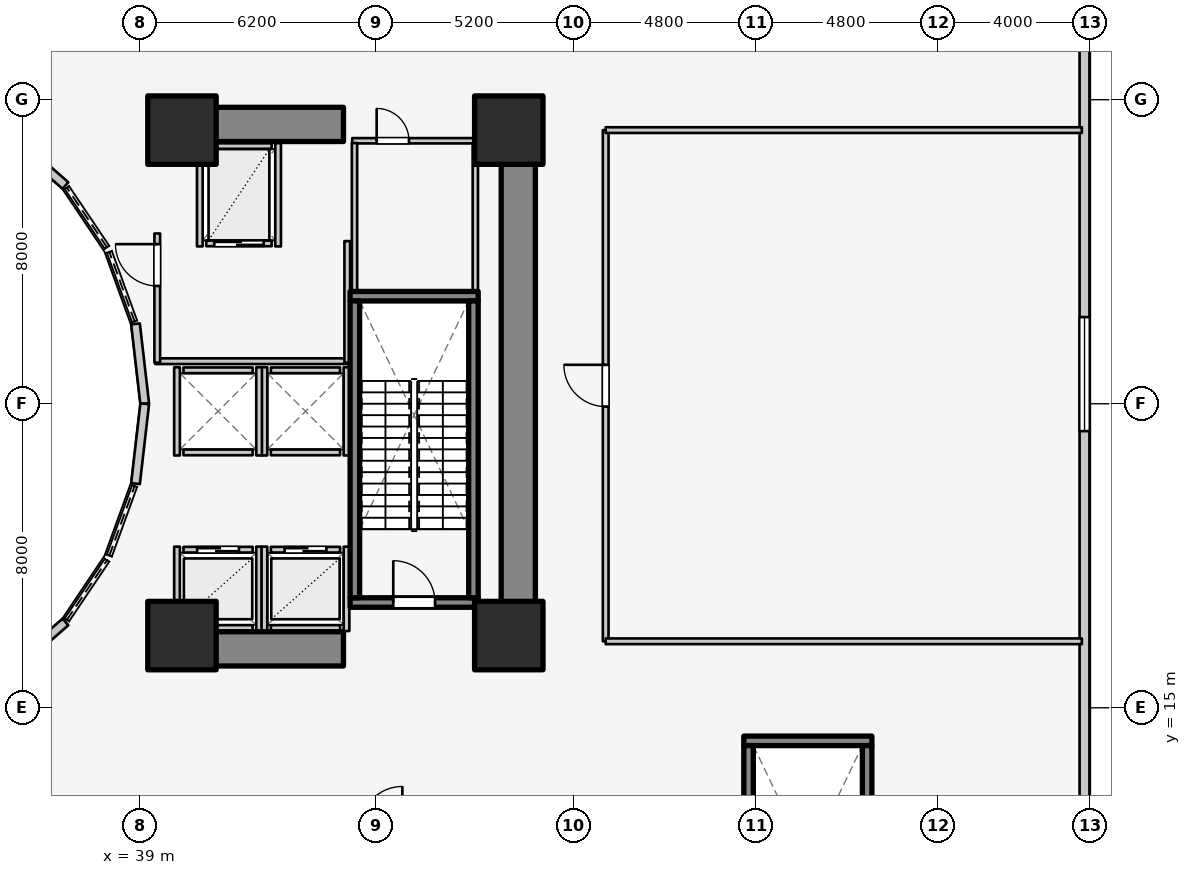
"""IFC4 building model, lengths in metres.
Left out: names, types, materials, properties, quantities, classifications, styles, units other than length and angle.
Written with IfcOpenShell. Run it as: python <this file> out.ifc"""

import sys

from ifc_helpers import new_model, si_unit, direction, frame, frame_2d, origin, origin_2d, place, context, subcontext, project, spatial, rectangle, extrude, element, fill, save


model = new_model("IFC4")
c1 = context("Model", 3, precision=1e-05, world=origin(), true_north=direction((0.0, 1.0)))
c2 = subcontext(c1, "Body", "Model", "MODEL_VIEW")
j1 = project(units=[si_unit("LENGTHUNIT", "METRE"), si_unit("PLANEANGLEUNIT", "RADIAN")], contexts=[c1])
p1 = place(None, origin())
s1 = spatial("IfcSite", under=j1, at=p1, CompositionType="ELEMENT")
p2 = place(p1, origin())
s2 = spatial("IfcBuilding", under=s1, at=p2, CompositionType="ELEMENT")
p3 = place(p2, frame((0.0, 0.0, 4.6)))
s3 = spatial("IfcBuildingStorey", under=s2, at=p3, CompositionType="ELEMENT", Elevation=4.6)
p4 = place(p3, frame((48.95, 17.05, 0.0), z_axis=(0.0, 0.0, 1.0), x_axis=(0.0, 1.0, 0.0)))
e1 = element("IfcWall", 1, at=p4, inside=s3, PredefinedType="SHEAR", context=c2, shape_type="SweptSolid", body=[
    extrude(rectangle(XDim=12.8, YDim=0.9, at=frame_2d((6.4, 0.0))), origin(), (0.0, 0.0, 1.0), 4.6),
])
for number, where, z_axis, x_axis in (
    (2, (39.85, 16.55, 0.0), (0.0, 0.0, 1.0), (1.0, 0.0, 0.0)),
    (3, (39.85, 30.35, 0.0), (0.0, 0.0, 1.0), (1.0, 0.0, 0.0)),
):
    element("IfcWall", number, at=place(p3, frame(where, z_axis=z_axis, x_axis=x_axis)), inside=s3, PredefinedType="SHEAR", context=c2, shape_type="SweptSolid", body=[
        extrude(rectangle(XDim=4.5, YDim=0.9, at=frame_2d((2.25, 0.0))), origin(), (0.0, 0.0, 1.0), 4.6),
    ])
p5 = place(p3, frame((44.525, 17.77, 0.0), z_axis=(0.0, 0.0, 1.0), x_axis=(1.0, 0.0, 0.0)))
e4 = element("IfcWall", 4, at=p5, inside=s3, PredefinedType="SOLIDWALL", context=c2, shape_type="SweptSolid", body=[
    extrude(rectangle(XDim=3.37, YDim=0.25, at=frame_2d((1.685, 0.0))), origin(), (0.0, 0.0, 1.0), 4.6),
])
p6 = place(p5, frame((1.135, 0.0, 0.0)))
e5 = element("IfcOpeningElement", 5, at=p6, cuts=e4, PredefinedType="OPENING", context=c2, shape_type="SweptSolid", body=[
    extrude(rectangle(XDim=1.1, YDim=2.1, at=frame_2d((0.55, 1.05))), frame((0.0, 0.135, 0.0), z_axis=(0.0, -1.0, 0.0), x_axis=(1.0, 0.0, 0.0)), (0.0, 0.0, 1.0), 0.27),
])
p7 = place(p3, frame((44.525, 25.83, 0.0), z_axis=(0.0, 0.0, 1.0), x_axis=(1.0, 0.0, 0.0)))
e6 = element("IfcWall", 6, at=p7, inside=s3, PredefinedType="SOLIDWALL", context=c2, shape_type="SweptSolid", body=[
    extrude(rectangle(XDim=3.37, YDim=0.25, at=frame_2d((1.685, 0.0))), origin(), (0.0, 0.0, 1.0), 4.6),
])
for number, where, z_axis, x_axis in (
    (7, (44.65, 17.895, 0.0), (0.0, 0.0, 1.0), (0.0, 1.0, 0.0)),
    (8, (47.77, 17.895, 0.0), (0.0, 0.0, 1.0), (0.0, 1.0, 0.0)),
):
    element("IfcWall", number, at=place(p3, frame(where, z_axis=z_axis, x_axis=x_axis)), inside=s3, PredefinedType="SOLIDWALL", context=c2, shape_type="SweptSolid", body=[
        extrude(rectangle(XDim=7.81, YDim=0.25, at=frame_2d((3.905, 0.0))), origin(), (0.0, 0.0, 1.0), 4.6),
    ])
p8 = place(p3, frame((54.885, 14.13, 0.0), z_axis=(0.0, 0.0, 1.0), x_axis=(1.0, 0.0, 0.0)))
e9 = element("IfcWall", 9, at=p8, inside=s3, PredefinedType="SOLIDWALL", context=c2, shape_type="SweptSolid", body=[
    extrude(rectangle(XDim=3.37, YDim=0.25, at=frame_2d((1.685, 0.0))), origin(), (0.0, 0.0, 1.0), 4.6),
])
for number, where, z_axis, x_axis in (
    (10, (55.01, 6.195, 0.0), (0.0, 0.0, 1.0), (0.0, 1.0, 0.0)),
    (11, (58.13, 6.195, 0.0), (0.0, 0.0, 1.0), (0.0, 1.0, 0.0)),
):
    element("IfcWall", number, at=place(p3, frame(where, z_axis=z_axis, x_axis=x_axis)), inside=s3, PredefinedType="SOLIDWALL", context=c2, shape_type="SweptSolid", body=[
        extrude(rectangle(XDim=7.81, YDim=0.25, at=frame_2d((3.905, 0.0))), origin(), (0.0, 0.0, 1.0), 4.6),
    ])
for number, where, z_axis, x_axis in (
    (12, (40.1, 16.9, 0.0), (0.0, 0.0, 1.0), (1.0, 0.0, 0.0)),
    (13, (48.7, 16.9, 0.0), (0.0, 0.0, 1.0), (1.0, 0.0, 0.0)),
    (14, (48.7, 30.2, 0.0), (0.0, 0.0, 1.0), (1.0, 0.0, 0.0)),
    (15, (40.1, 30.2, 0.0), (0.0, 0.0, 1.0), (1.0, 0.0, 0.0)),
):
    element("IfcColumn", number, at=place(p3, frame(where, z_axis=z_axis, x_axis=x_axis)), inside=s3, PredefinedType="COLUMN", context=c2, shape_type="SweptSolid", body=[
        extrude(rectangle(XDim=1.8, YDim=1.8, at=origin_2d()), origin(), (0.0, 0.0, 1.0), 4.6),
    ])
p9 = place(p3, frame((63.85, 0.28, 0.0), z_axis=(0.0, 0.0, 1.0), x_axis=(0.0, 1.0, 0.0)))
e16 = element("IfcWall", 16, at=p9, inside=s3, PredefinedType="STANDARD", context=c2, shape_type="SweptSolid", body=[
    extrude(rectangle(XDim=45.44, YDim=0.26, at=frame_2d((22.72, 0.0))), origin(), (0.0, 0.0, 1.0), 4.28),
])
p10 = place(p9, frame((6.0, 0.0, 0.9)))
e17 = element("IfcOpeningElement", 17, at=p10, cuts=e16, PredefinedType="OPENING", context=c2, shape_type="SweptSolid", body=[
    extrude(rectangle(XDim=3.0, YDim=2.4, at=frame_2d((1.5, 1.2))), frame((0.0, 0.14, 0.0), z_axis=(0.0, -1.0, 0.0), x_axis=(1.0, 0.0, 0.0)), (0.0, 0.0, 1.0), 0.28),
])
p11 = place(p9, frame((22.0, 0.0, 0.9)))
e18 = element("IfcOpeningElement", 18, at=p11, cuts=e16, PredefinedType="OPENING", context=c2, shape_type="SweptSolid", body=[
    extrude(rectangle(XDim=3.0, YDim=2.4, at=frame_2d((1.5, 1.2))), frame((0.0, 0.14, 0.0), z_axis=(0.0, -1.0, 0.0), x_axis=(1.0, 0.0, 0.0)), (0.0, 0.0, 1.0), 0.28),
])
p12 = place(p9, frame((38.0, 0.0, 0.9)))
e19 = element("IfcOpeningElement", 19, at=p12, cuts=e16, PredefinedType="OPENING", context=c2, shape_type="SweptSolid", body=[
    extrude(rectangle(XDim=3.0, YDim=2.4, at=frame_2d((1.5, 1.2))), frame((0.0, 0.14, 0.0), z_axis=(0.0, -1.0, 0.0), x_axis=(1.0, 0.0, 0.0)), (0.0, 0.0, 1.0), 0.28),
])
p13 = place(p3, frame((39.12, 23.0, 0.0), z_axis=(0.0, 0.0, 1.0), x_axis=(-0.114711713601, 0.993398823617, 0.0)))
e20 = element("IfcWall", 20, at=p13, inside=s3, PredefinedType="STANDARD", context=c2, shape_type="SweptSolid", body=[
    extrude(rectangle(XDim=2.115, YDim=0.23, at=frame_2d((1.058, 0.0))), origin(), (0.0, 0.0, 1.0), 3.28),
])
for number, where, z_axis, x_axis in (
    (21, (37.035, 28.742, 0.0), (0.0, 0.0, 1.0), (-0.753, 0.659, 0.0)),
    (22, (35.56, 15.968, 0.0), (0.0, 0.0, 1.0), (0.753, 0.659, 0.0)),
):
    element("IfcWall", number, at=place(p3, frame(where, z_axis=z_axis, x_axis=x_axis)), inside=s3, PredefinedType="STANDARD", context=c2, shape_type="SweptSolid", body=[
        extrude(rectangle(XDim=1.959, YDim=0.23, at=frame_2d((0.98, 0.0))), origin(), (0.0, 0.0, 1.0), 3.28),
    ])
p14 = place(p3, frame((38.877, 20.898, 0.0), z_axis=(0.0, 0.0, 1.0), x_axis=(0.114711713601, 0.993398823617, 0.0)))
e23 = element("IfcWall", 23, at=p14, inside=s3, PredefinedType="STANDARD", context=c2, shape_type="SweptSolid", body=[
    extrude(rectangle(XDim=2.115, YDim=0.23, at=frame_2d((1.058, 0.0))), origin(), (0.0, 0.0, 1.0), 3.28),
])
p15 = place(p3, frame((40.14, 19.16, 0.0), z_axis=(0.0, 0.0, 1.0), x_axis=(1.0, 0.0, 0.0)))
e24 = element("IfcWall", 24, at=p15, inside=s3, PredefinedType="SOLIDWALL", context=c2, shape_type="SweptSolid", body=[
    extrude(rectangle(XDim=1.82, YDim=0.15, at=frame_2d((0.91, 0.0))), origin(), (0.0, 0.0, 1.0), 3.62),
])
p16 = place(p15, frame((0.36, 0.0, 0.0)))
e25 = element("IfcOpeningElement", 25, at=p16, cuts=e24, PredefinedType="OPENING", context=c2, shape_type="SweptSolid", body=[
    extrude(rectangle(XDim=1.1, YDim=2.1, at=frame_2d((0.55, 1.05))), frame((0.0, 0.085, 0.0), z_axis=(0.0, -1.0, 0.0), x_axis=(1.0, 0.0, 0.0)), (0.0, 0.0, 1.0), 0.17),
])
p17 = place(p3, frame((40.14, 17.1, 0.0), z_axis=(0.0, 0.0, 1.0), x_axis=(1.0, 0.0, 0.0)))
e26 = element("IfcWall", 26, at=p17, inside=s3, PredefinedType="SOLIDWALL", context=c2, shape_type="SweptSolid", body=[
    extrude(rectangle(XDim=1.82, YDim=0.15, at=frame_2d((0.91, 0.0))), origin(), (0.0, 0.0, 1.0), 3.62),
])
p18 = place(p3, frame((39.97, 17.02, 0.0), z_axis=(0.0, 0.0, 1.0), x_axis=(0.0, 1.0, 0.0)))
e27 = element("IfcWall", 27, at=p18, inside=s3, PredefinedType="SOLIDWALL", context=c2, shape_type="SweptSolid", body=[
    extrude(rectangle(XDim=2.22, YDim=0.15, at=frame_2d((1.11, 0.0))), origin(), (0.0, 0.0, 1.0), 3.3),
])
p19 = place(p3, frame((42.13, 17.02, 0.0), z_axis=(0.0, 0.0, 1.0), x_axis=(0.0, 1.0, 0.0)))
e28 = element("IfcWall", 28, at=p19, inside=s3, PredefinedType="SOLIDWALL", context=c2, shape_type="SweptSolid", body=[
    extrude(rectangle(XDim=2.22, YDim=0.15, at=frame_2d((1.11, 0.0))), origin(), (0.0, 0.0, 1.0), 4.255),
])
p20 = place(p3, frame((42.44, 19.16, 0.0), z_axis=(0.0, 0.0, 1.0), x_axis=(1.0, 0.0, 0.0)))
e29 = element("IfcWall", 29, at=p20, inside=s3, PredefinedType="SOLIDWALL", context=c2, shape_type="SweptSolid", body=[
    extrude(rectangle(XDim=1.82, YDim=0.15, at=frame_2d((0.91, 0.0))), origin(), (0.0, 0.0, 1.0), 4.255),
])
p21 = place(p20, frame((0.36, 0.0, 0.0)))
e30 = element("IfcOpeningElement", 30, at=p21, cuts=e29, PredefinedType="OPENING", context=c2, shape_type="SweptSolid", body=[
    extrude(rectangle(XDim=1.1, YDim=2.1, at=frame_2d((0.55, 1.05))), frame((0.0, 0.085, 0.0), z_axis=(0.0, -1.0, 0.0), x_axis=(1.0, 0.0, 0.0)), (0.0, 0.0, 1.0), 0.17),
])
p22 = place(p3, frame((42.44, 17.1, 0.0), z_axis=(0.0, 0.0, 1.0), x_axis=(1.0, 0.0, 0.0)))
e31 = element("IfcWall", 31, at=p22, inside=s3, PredefinedType="SOLIDWALL", context=c2, shape_type="SweptSolid", body=[
    extrude(rectangle(XDim=1.82, YDim=0.15, at=frame_2d((0.91, 0.0))), origin(), (0.0, 0.0, 1.0), 4.255),
])
p23 = place(p3, frame((42.27, 17.02, 0.0), z_axis=(0.0, 0.0, 1.0), x_axis=(0.0, 1.0, 0.0)))
e32 = element("IfcWall", 32, at=p23, inside=s3, PredefinedType="SOLIDWALL", context=c2, shape_type="SweptSolid", body=[
    extrude(rectangle(XDim=2.22, YDim=0.15, at=frame_2d((1.11, 0.0))), origin(), (0.0, 0.0, 1.0), 4.255),
])
p24 = place(p3, frame((44.43, 17.02, 0.0), z_axis=(0.0, 0.0, 1.0), x_axis=(0.0, 1.0, 0.0)))
e33 = element("IfcWall", 33, at=p24, inside=s3, PredefinedType="SOLIDWALL", context=c2, shape_type="SweptSolid", body=[
    extrude(rectangle(XDim=2.22, YDim=0.15, at=frame_2d((1.11, 0.0))), origin(), (0.0, 0.0, 1.0), 3.62),
])
for number, where, z_axis, x_axis in (
    (34, (42.44, 21.72, 0.0), (0.0, 0.0, 1.0), (1.0, 0.0, 0.0)),
    (35, (42.44, 23.88, 0.0), (0.0, 0.0, 1.0), (1.0, 0.0, 0.0)),
):
    element("IfcWall", number, at=place(p3, frame(where, z_axis=z_axis, x_axis=x_axis)), inside=s3, PredefinedType="SOLIDWALL", context=c2, shape_type="SweptSolid", body=[
        extrude(rectangle(XDim=1.82, YDim=0.15, at=frame_2d((0.91, 0.0))), origin(), (0.0, 0.0, 1.0), 4.255),
    ])
for number, where, z_axis, x_axis in (
    (36, (42.27, 21.64, 0.0), (0.0, 0.0, 1.0), (0.0, 1.0, 0.0)),
    (37, (44.43, 21.64, 0.0), (0.0, 0.0, 1.0), (0.0, 1.0, 0.0)),
):
    element("IfcWall", number, at=place(p3, frame(where, z_axis=z_axis, x_axis=x_axis)), inside=s3, PredefinedType="SOLIDWALL", context=c2, shape_type="SweptSolid", body=[
        extrude(rectangle(XDim=2.32, YDim=0.15, at=frame_2d((1.16, 0.0))), origin(), (0.0, 0.0, 1.0), 4.255),
    ])
for number, where, z_axis, x_axis in (
    (38, (40.14, 21.72, 0.0), (0.0, 0.0, 1.0), (1.0, 0.0, 0.0)),
    (39, (40.14, 23.88, 0.0), (0.0, 0.0, 1.0), (1.0, 0.0, 0.0)),
):
    element("IfcWall", number, at=place(p3, frame(where, z_axis=z_axis, x_axis=x_axis)), inside=s3, PredefinedType="SOLIDWALL", context=c2, shape_type="SweptSolid", body=[
        extrude(rectangle(XDim=1.82, YDim=0.15, at=frame_2d((0.91, 0.0))), origin(), (0.0, 0.0, 1.0), 3.62),
    ])
p25 = place(p3, frame((39.97, 21.64, 0.0), z_axis=(0.0, 0.0, 1.0), x_axis=(0.0, 1.0, 0.0)))
e40 = element("IfcWall", 40, at=p25, inside=s3, PredefinedType="SOLIDWALL", context=c2, shape_type="SweptSolid", body=[
    extrude(rectangle(XDim=2.32, YDim=0.15, at=frame_2d((1.16, 0.0))), origin(), (0.0, 0.0, 1.0), 3.62),
])
p26 = place(p3, frame((42.13, 21.64, 0.0), z_axis=(0.0, 0.0, 1.0), x_axis=(0.0, 1.0, 0.0)))
e41 = element("IfcWall", 41, at=p26, inside=s3, PredefinedType="SOLIDWALL", context=c2, shape_type="SweptSolid", body=[
    extrude(rectangle(XDim=2.32, YDim=0.15, at=frame_2d((1.16, 0.0))), origin(), (0.0, 0.0, 1.0), 4.255),
])
p27 = place(p3, frame((40.74, 27.22, 0.0), z_axis=(0.0, 0.0, 1.0), x_axis=(1.0, 0.0, 0.0)))
e42 = element("IfcWall", 42, at=p27, inside=s3, PredefinedType="SOLIDWALL", context=c2, shape_type="SweptSolid", body=[
    extrude(rectangle(XDim=1.72, YDim=0.15, at=frame_2d((0.86, 0.0))), origin(), (0.0, 0.0, 1.0), 4.255),
])
p28 = place(p27, frame((0.21, 0.0, 0.0)))
e43 = element("IfcOpeningElement", 43, at=p28, cuts=e42, PredefinedType="OPENING", context=c2, shape_type="SweptSolid", body=[
    extrude(rectangle(XDim=1.3, YDim=2.1, at=frame_2d((0.65, 1.05))), frame((0.0, 0.085, 0.0), z_axis=(0.0, -1.0, 0.0), x_axis=(1.0, 0.0, 0.0)), (0.0, 0.0, 1.0), 0.17),
])
p29 = place(p3, frame((40.74, 29.78, 0.0), z_axis=(0.0, 0.0, 1.0), x_axis=(1.0, 0.0, 0.0)))
e44 = element("IfcWall", 44, at=p29, inside=s3, PredefinedType="SOLIDWALL", context=c2, shape_type="SweptSolid", body=[
    extrude(rectangle(XDim=1.72, YDim=0.15, at=frame_2d((0.86, 0.0))), origin(), (0.0, 0.0, 1.0), 4.255),
])
for number, where, z_axis, x_axis in (
    (45, (40.57, 27.14, 0.0), (0.0, 0.0, 1.0), (0.0, 1.0, 0.0)),
    (46, (42.63, 27.14, 0.0), (0.0, 0.0, 1.0), (0.0, 1.0, 0.0)),
):
    element("IfcWall", number, at=place(p3, frame(where, z_axis=z_axis, x_axis=x_axis)), inside=s3, PredefinedType="SOLIDWALL", context=c2, shape_type="SweptSolid", body=[
        extrude(rectangle(XDim=2.72, YDim=0.15, at=frame_2d((1.36, 0.0))), origin(), (0.0, 0.0, 1.0), 4.255),
    ])
p30 = place(p3, frame((39.4, 24.12, 0.0), z_axis=(0.0, 0.0, 1.0), x_axis=(1.0, 0.0, 0.0)))
e47 = element("IfcWall", 47, at=p30, inside=s3, PredefinedType="PARTITIONING", context=c2, shape_type="SweptSolid", body=[
    extrude(rectangle(XDim=5.08, YDim=0.15, at=frame_2d((2.54, 0.0))), origin(), (0.0, 0.0, 1.0), 3.62),
])
p31 = place(p3, frame((44.45, 24.08, 0.0), z_axis=(0.0, 0.0, 1.0), x_axis=(0.0, 1.0, 0.0)))
e48 = element("IfcWall", 48, at=p31, inside=s3, PredefinedType="PARTITIONING", context=c2, shape_type="SweptSolid", body=[
    extrude(rectangle(XDim=3.2, YDim=0.15, at=frame_2d((1.6, 0.0))), origin(), (0.0, 0.0, 1.0), 4.255),
])
p32 = place(p3, frame((39.45, 24.08, 0.0), z_axis=(0.0, 0.0, 1.0), x_axis=(0.0, 1.0, 0.0)))
e49 = element("IfcWall", 49, at=p32, inside=s3, PredefinedType="PARTITIONING", context=c2, shape_type="SweptSolid", body=[
    extrude(rectangle(XDim=3.4, YDim=0.15, at=frame_2d((1.7, 0.0))), origin(), (0.0, 0.0, 1.0), 4.255),
])
p33 = place(p32, frame((2.02, 0.0, 0.0)))
e50 = element("IfcOpeningElement", 50, at=p33, cuts=e49, PredefinedType="OPENING", context=c2, shape_type="SweptSolid", body=[
    extrude(rectangle(XDim=1.1, YDim=2.1, at=frame_2d((0.55, 1.05))), frame((0.0, 0.085, 0.0), z_axis=(0.0, -1.0, 0.0), x_axis=(1.0, 0.0, 0.0)), (0.0, 0.0, 1.0), 0.17),
])
p34 = place(p3, frame((51.25, 16.75, 0.0), z_axis=(0.0, 0.0, 1.0), x_axis=(0.0, 1.0, 0.0)))
e51 = element("IfcWall", 51, at=p34, inside=s3, PredefinedType="PARTITIONING", context=c2, shape_type="SweptSolid", body=[
    extrude(rectangle(XDim=13.45, YDim=0.15, at=frame_2d((6.725, 0.0))), origin(), (0.0, 0.0, 1.0), 4.255),
])
p35 = place(p34, frame((6.175, 0.0, 0.0)))
e52 = element("IfcOpeningElement", 52, at=p35, cuts=e51, PredefinedType="OPENING", context=c2, shape_type="SweptSolid", body=[
    extrude(rectangle(XDim=1.1, YDim=2.1, at=frame_2d((0.55, 1.05))), frame((0.0, 0.085, 0.0), z_axis=(0.0, -1.0, 0.0), x_axis=(1.0, 0.0, 0.0)), (0.0, 0.0, 1.0), 0.17),
])
for number, where, z_axis, x_axis in (
    (53, (51.25, 16.75, 0.0), (0.0, 0.0, 1.0), (1.0, 0.0, 0.0)),
    (54, (51.25, 30.2, 0.0), (0.0, 0.0, 1.0), (1.0, 0.0, 0.0)),
):
    element("IfcWall", number, at=place(p3, frame(where, z_axis=z_axis, x_axis=x_axis)), inside=s3, PredefinedType="PARTITIONING", context=c2, shape_type="SweptSolid", body=[
        extrude(rectangle(XDim=12.53, YDim=0.15, at=frame_2d((6.265, 0.0))), origin(), (0.0, 0.0, 1.0), 3.3),
    ])
p36 = place(p3, frame((44.58, 29.92, 0.0), z_axis=(0.0, 0.0, 1.0), x_axis=(1.0, 0.0, 0.0)))
e55 = element("IfcWall", 55, at=p36, inside=s3, PredefinedType="PLUMBINGWALL", context=c2, shape_type="SweptSolid", body=[
    extrude(rectangle(XDim=3.3, YDim=0.14, at=frame_2d((1.65, 0.0))), origin(), (0.0, 0.0, 1.0), 4.255),
])
p37 = place(p36, frame((0.643, 0.0, 0.0)))
e56 = element("IfcOpeningElement", 56, at=p37, cuts=e55, PredefinedType="OPENING", context=c2, shape_type="SweptSolid", body=[
    extrude(rectangle(XDim=0.85, YDim=2.05, at=frame_2d((0.425, 1.025))), frame((0.0, 0.08, 0.0), z_axis=(0.0, -1.0, 0.0), x_axis=(1.0, 0.0, 0.0)), (0.0, 0.0, 1.0), 0.16),
])
for number, where, z_axis, x_axis in (
    (57, (44.64, 25.98, 0.0), (0.0, 0.0, 1.0), (0.0, 1.0, 0.0)),
    (58, (47.82, 25.98, 0.0), (0.0, 0.0, 1.0), (0.0, 1.0, 0.0)),
):
    element("IfcWall", number, at=place(p3, frame(where, z_axis=z_axis, x_axis=x_axis)), inside=s3, PredefinedType="PLUMBINGWALL", context=c2, shape_type="SweptSolid", body=[
        extrude(rectangle(XDim=3.88, YDim=0.14, at=frame_2d((1.94, 0.0))), origin(), (0.0, 0.0, 1.0), 4.255),
    ])
p38 = place(p11, origin())
e59 = element("IfcWindow", 59, at=p38, inside=s3, PartitioningType="SINGLE_PANEL", PredefinedType="WINDOW", context=c2, shape_type="SweptSolid", body=[
    extrude(rectangle(XDim=3.0, YDim=2.4, at=frame_2d((1.5, 1.2))), frame((0.0, 0.03, 0.0), z_axis=(0.0, -1.0, 0.0), x_axis=(1.0, 0.0, 0.0)), (0.0, 0.0, 1.0), 0.06),
])
fill(e18, e59)
p39 = place(p6, origin())
e60 = element("IfcDoor", 60, at=p39, inside=s3, OperationType="SINGLE_SWING_LEFT", PredefinedType="DOOR", context=c2, shape_type="SweptSolid", body=[
    extrude(rectangle(XDim=1.1, YDim=2.1, at=frame_2d((0.55, 1.05))), frame((0.0, 0.025, 0.0), z_axis=(0.0, -1.0, 0.0), x_axis=(1.0, 0.0, 0.0)), (0.0, 0.0, 1.0), 0.05),
])
fill(e5, e60)
p40 = place(p16, origin())
e61 = element("IfcDoor", 61, at=p40, inside=s3, OperationType="DOUBLE_DOOR_SLIDING", PredefinedType="DOOR", context=c2, shape_type="SweptSolid", body=[
    extrude(rectangle(XDim=1.1, YDim=2.1, at=frame_2d((0.55, 1.05))), frame((0.0, 0.025, 0.0), z_axis=(0.0, -1.0, 0.0), x_axis=(1.0, 0.0, 0.0)), (0.0, 0.0, 1.0), 0.05),
])
fill(e25, e61)
p41 = place(p21, origin())
e62 = element("IfcDoor", 62, at=p41, inside=s3, OperationType="DOUBLE_DOOR_SLIDING", PredefinedType="DOOR", context=c2, shape_type="SweptSolid", body=[
    extrude(rectangle(XDim=1.1, YDim=2.1, at=frame_2d((0.55, 1.05))), frame((0.0, 0.025, 0.0), z_axis=(0.0, -1.0, 0.0), x_axis=(1.0, 0.0, 0.0)), (0.0, 0.0, 1.0), 0.05),
])
fill(e30, e62)
p42 = place(p28, origin())
e63 = element("IfcDoor", 63, at=p42, inside=s3, OperationType="DOUBLE_DOOR_SLIDING", PredefinedType="DOOR", context=c2, shape_type="SweptSolid", body=[
    extrude(rectangle(XDim=1.3, YDim=2.1, at=frame_2d((0.65, 1.05))), frame((0.0, 0.025, 0.0), z_axis=(0.0, -1.0, 0.0), x_axis=(1.0, 0.0, 0.0)), (0.0, 0.0, 1.0), 0.05),
])
fill(e43, e63)
p43 = place(p33, origin())
e64 = element("IfcDoor", 64, at=p43, inside=s3, OperationType="SINGLE_SWING_RIGHT", PredefinedType="DOOR", context=c2, shape_type="SweptSolid", body=[
    extrude(rectangle(XDim=1.1, YDim=2.1, at=frame_2d((0.55, 1.05))), frame((0.0, 0.025, 0.0), z_axis=(0.0, -1.0, 0.0), x_axis=(1.0, 0.0, 0.0)), (0.0, 0.0, 1.0), 0.05),
])
fill(e50, e64)
p44 = place(p35, origin())
e65 = element("IfcDoor", 65, at=p44, inside=s3, OperationType="SINGLE_SWING_RIGHT", PredefinedType="DOOR", context=c2, shape_type="SweptSolid", body=[
    extrude(rectangle(XDim=1.1, YDim=2.1, at=frame_2d((0.55, 1.05))), frame((0.0, 0.025, 0.0), z_axis=(0.0, -1.0, 0.0), x_axis=(1.0, 0.0, 0.0)), (0.0, 0.0, 1.0), 0.05),
])
fill(e52, e65)
p45 = place(p37, origin())
e66 = element("IfcDoor", 66, at=p45, inside=s3, OperationType="SINGLE_SWING_LEFT", PredefinedType="DOOR", context=c2, shape_type="SweptSolid", body=[
    extrude(rectangle(XDim=0.85, YDim=2.05, at=frame_2d((0.425, 1.025))), frame((0.0, 0.025, 0.0), z_axis=(0.0, -1.0, 0.0), x_axis=(1.0, 0.0, 0.0)), (0.0, 0.0, 1.0), 0.05),
])
fill(e56, e66)
save(model, sys.argv[1])
